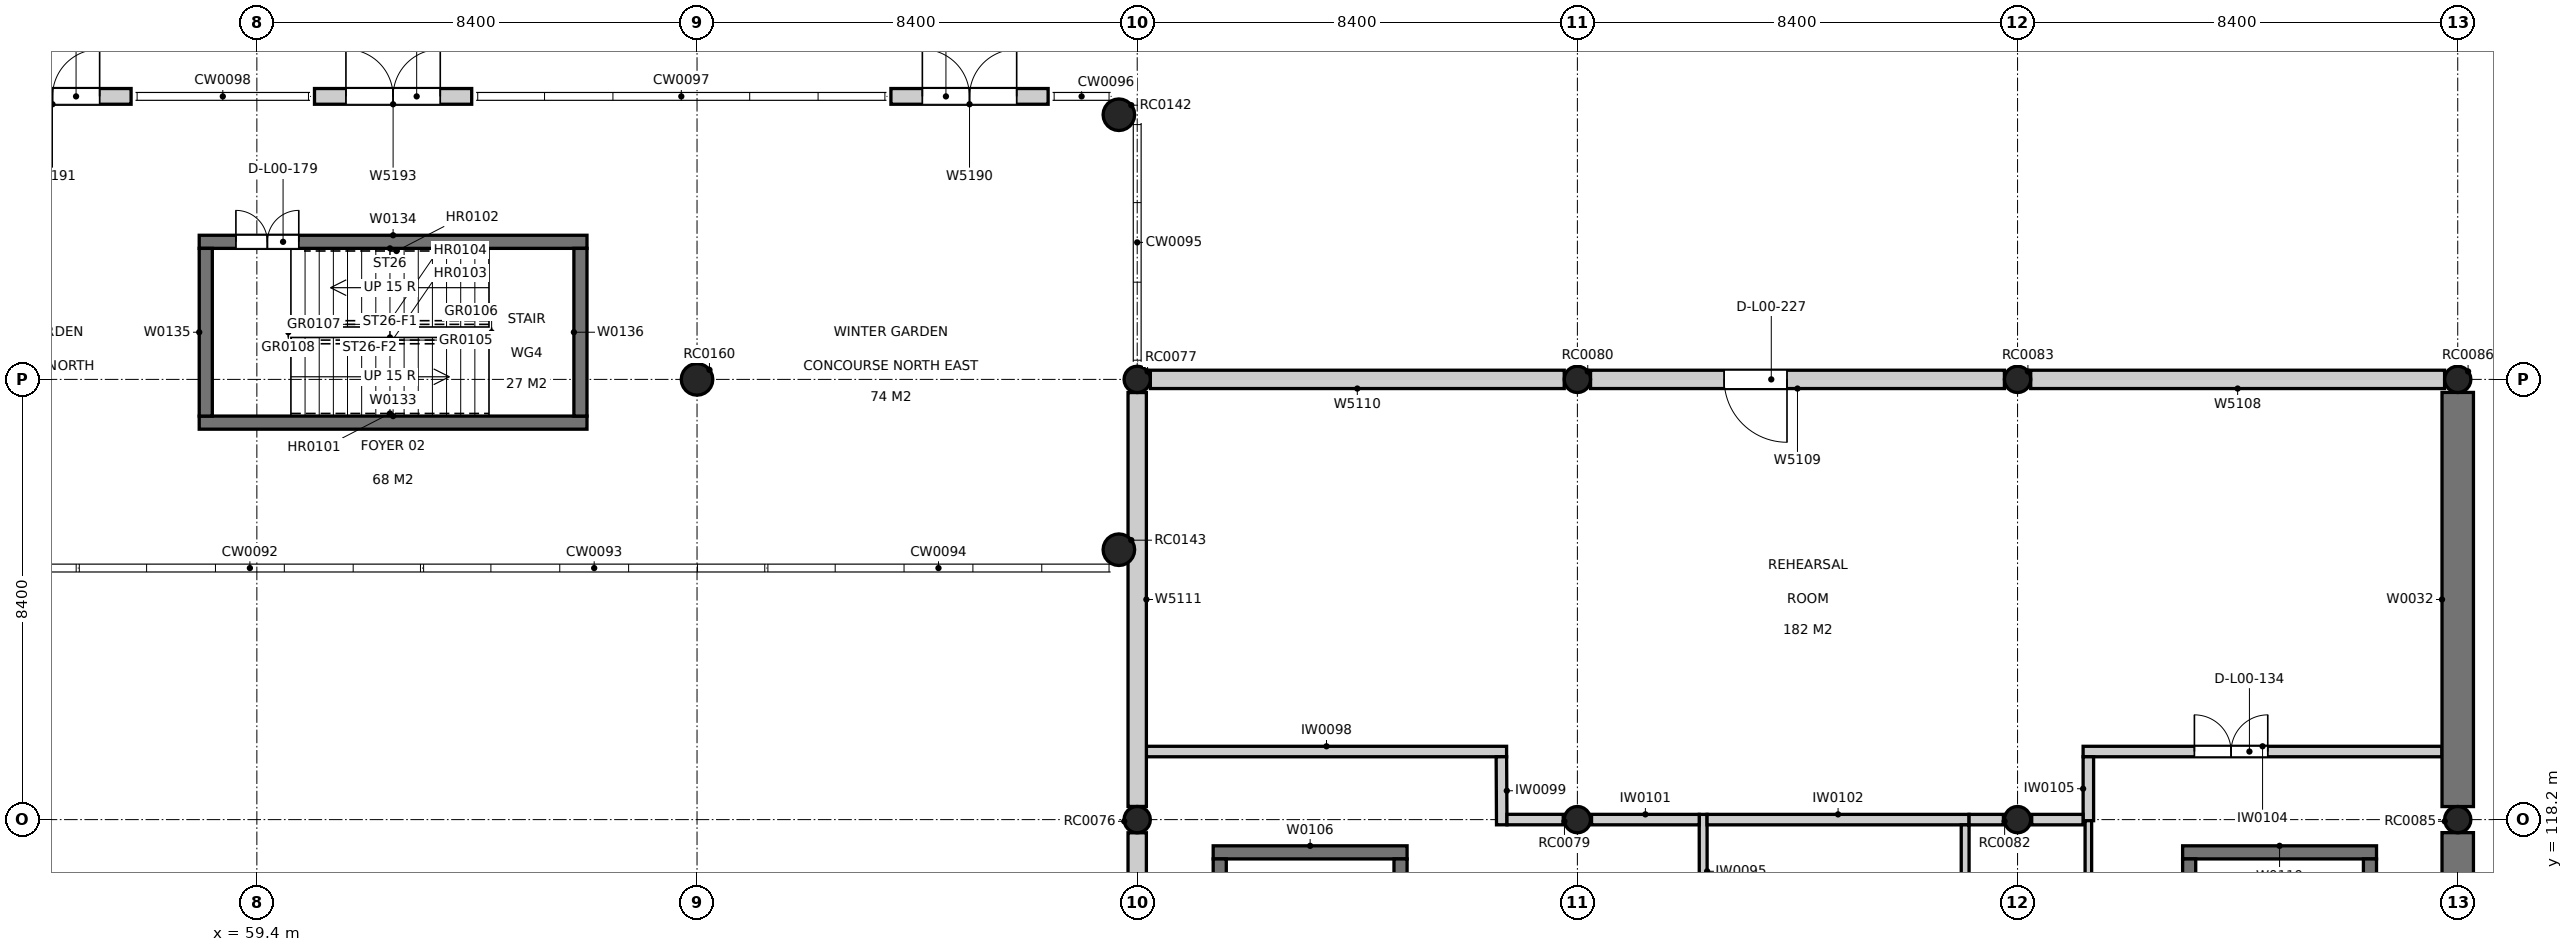
"""IFC4 building model, lengths in metres.
Left out: names, types, materials, properties, quantities, classifications, styles, units other than length and angle.
Written with IfcOpenShell. Run it as: python <this file> out.ifc"""

import sys

from ifc_helpers import new_model, si_unit, direction, frame, frame_2d, origin, origin_2d, place, context, subcontext, project, spatial, rectangle, circle, extrude, element, fill, save


model = new_model("IFC4")
c1 = context("Model", 3, precision=1e-05, world=origin(), true_north=direction((0.0, 1.0)))
c2 = subcontext(c1, "Body", "Model", "MODEL_VIEW")
j1 = project(units=[si_unit("LENGTHUNIT", "METRE"), si_unit("PLANEANGLEUNIT", "RADIAN")], contexts=[c1])
p1 = place(None, origin())
s1 = spatial("IfcSite", under=j1, at=p1, CompositionType="ELEMENT")
p2 = place(p1, origin())
s2 = spatial("IfcBuilding", under=s1, at=p2, CompositionType="ELEMENT")
p3 = place(p2, origin())
s3 = spatial("IfcBuildingStorey", under=s2, at=p3, CompositionType="ELEMENT", Elevation=0.0)
for number, where, z_axis, x_axis in (
    (1, (76.2, 118.2, -0.4), (0.0, 0.0, 1.0), (1.0, 0.0, 0.0)),
    (2, (76.2, 126.6, -0.4), (0.0, 0.0, 1.0), (1.0, 0.0, 0.0)),
    (3, (84.6, 118.2, -0.4), (0.0, 0.0, 1.0), (1.0, 0.0, 0.0)),
    (4, (84.6, 126.6, -0.4), (0.0, 0.0, 1.0), (1.0, 0.0, 0.0)),
    (5, (93.0, 118.2, -0.4), (0.0, 0.0, 1.0), (1.0, 0.0, 0.0)),
    (6, (93.0, 126.6, -0.4), (0.0, 0.0, 1.0), (1.0, 0.0, 0.0)),
    (7, (101.4, 118.2, -0.4), (0.0, 0.0, 1.0), (1.0, 0.0, 0.0)),
    (8, (101.4, 126.6, -0.4), (0.0, 0.0, 1.0), (1.0, 0.0, 0.0)),
):
    element("IfcColumn", number, at=place(p3, frame(where, z_axis=z_axis, x_axis=x_axis)), inside=s3, PredefinedType="COLUMN", context=c2, shape_type="SweptSolid", body=[
        extrude(circle(Radius=0.25, at=origin_2d()), origin(), (0.0, 0.0, 1.0), 5.2),
    ])
p4 = place(p3, frame((101.4, 110.049, 0.0), z_axis=(0.0, 0.0, 1.0), x_axis=(0.0, 1.0, 0.0)))
e9 = element("IfcWall", 9, at=p4, inside=s3, PredefinedType="SOLIDWALL", context=c2, shape_type="SweptSolid", body=[
    extrude(rectangle(XDim=7.902, YDim=0.6, at=frame_2d((3.951, 0.0))), origin(), (0.0, 0.0, 1.0), 4.8),
])
p5 = place(p4, frame((4.551, 0.0, 0.0), z_axis=(0.0, 0.0, 1.0), x_axis=(-1.0, 0.0, 0.0)))
e10 = element("IfcOpeningElement", 10, at=p5, cuts=e9, PredefinedType="OPENING", context=c2, shape_type="SweptSolid", body=[
    extrude(rectangle(XDim=1.2, YDim=2.1, at=frame_2d((0.6, 1.05))), frame((0.0, 0.31, 0.0), z_axis=(0.0, -1.0, 0.0), x_axis=(1.0, 0.0, 0.0)), (0.0, 0.0, 1.0), 0.62),
])
p6 = place(p3, frame((101.4, 118.449, 0.0), z_axis=(0.0, 0.0, 1.0), x_axis=(0.0, 1.0, 0.0)))
e11 = element("IfcWall", 11, at=p6, inside=s3, PredefinedType="SOLIDWALL", context=c2, shape_type="SweptSolid", body=[
    extrude(rectangle(XDim=7.902, YDim=0.6, at=frame_2d((3.951, 0.0))), origin(), (0.0, 0.0, 1.0), 4.8),
])
for number, where, z_axis, x_axis in (
    (12, (75.85, 131.65, -0.4), (0.0, 0.0, 1.0), (1.0, 0.0, 0.0)),
    (13, (75.85, 123.35, -0.4), (0.0, 0.0, 1.0), (1.0, 0.0, 0.0)),
    (14, (67.8, 126.6, -0.4), (0.0, 0.0, 1.0), (1.0, 0.0, 0.0)),
):
    element("IfcColumn", number, at=place(p3, frame(where, z_axis=z_axis, x_axis=x_axis)), inside=s3, PredefinedType="COLUMN", context=c2, shape_type="SweptSolid", body=[
        extrude(circle(Radius=0.3, at=origin_2d()), origin(), (0.0, 0.0, 1.0), 5.2),
    ])
p7 = place(p3, frame((77.65, 117.575, 0.0), z_axis=(0.0, 0.0, 1.0), x_axis=(1.0, 0.0, 0.0)))
e15 = element("IfcWall", 15, at=p7, inside=s3, PredefinedType="SOLIDWALL", context=c2, shape_type="SweptSolid", body=[
    extrude(rectangle(XDim=3.7, YDim=0.25, at=frame_2d((1.85, 0.0))), origin(), (0.0, 0.0, 1.0), 4.8),
])
p8 = place(p3, frame((77.775, 110.55, 0.0), z_axis=(0.0, 0.0, 1.0), x_axis=(0.0, 1.0, 0.0)))
e16 = element("IfcWall", 16, at=p8, inside=s3, PredefinedType="SOLIDWALL", context=c2, shape_type="SweptSolid", body=[
    extrude(rectangle(XDim=6.9, YDim=0.25, at=frame_2d((3.45, 0.0))), origin(), (0.0, 0.0, 1.0), 4.8),
])
p9 = place(p3, frame((81.225, 110.55, 0.0), z_axis=(0.0, 0.0, 1.0), x_axis=(0.0, 1.0, 0.0)))
e17 = element("IfcWall", 17, at=p9, inside=s3, PredefinedType="SOLIDWALL", context=c2, shape_type="SweptSolid", body=[
    extrude(rectangle(XDim=6.9, YDim=0.25, at=frame_2d((3.45, 0.0))), origin(), (0.0, 0.0, 1.0), 4.8),
])
p10 = place(p9, frame((5.15, 0.0, 0.0)))
e18 = element("IfcOpeningElement", 18, at=p10, cuts=e17, PredefinedType="OPENING", context=c2, shape_type="SweptSolid", body=[
    extrude(rectangle(XDim=1.2, YDim=2.1, at=frame_2d((0.6, 1.05))), frame((0.0, 0.135, 0.0), z_axis=(0.0, -1.0, 0.0), x_axis=(1.0, 0.0, 0.0)), (0.0, 0.0, 1.0), 0.27),
])
p11 = place(p3, frame((96.15, 117.575, 0.0), z_axis=(0.0, 0.0, 1.0), x_axis=(1.0, 0.0, 0.0)))
e19 = element("IfcWall", 19, at=p11, inside=s3, PredefinedType="SOLIDWALL", context=c2, shape_type="SweptSolid", body=[
    extrude(rectangle(XDim=3.7, YDim=0.25, at=frame_2d((1.85, 0.0))), origin(), (0.0, 0.0, 1.0), 4.8),
])
p12 = place(p3, frame((96.275, 110.55, 0.0), z_axis=(0.0, 0.0, 1.0), x_axis=(0.0, 1.0, 0.0)))
e20 = element("IfcWall", 20, at=p12, inside=s3, PredefinedType="SOLIDWALL", context=c2, shape_type="SweptSolid", body=[
    extrude(rectangle(XDim=6.9, YDim=0.25, at=frame_2d((3.45, 0.0))), origin(), (0.0, 0.0, 1.0), 4.8),
])
p13 = place(p3, frame((99.725, 110.55, 0.0), z_axis=(0.0, 0.0, 1.0), x_axis=(0.0, 1.0, 0.0)))
e21 = element("IfcWall", 21, at=p13, inside=s3, PredefinedType="SOLIDWALL", context=c2, shape_type="SweptSolid", body=[
    extrude(rectangle(XDim=6.9, YDim=0.25, at=frame_2d((3.45, 0.0))), origin(), (0.0, 0.0, 1.0), 4.8),
])
p14 = place(p13, frame((5.15, 0.0, 0.0)))
e22 = element("IfcOpeningElement", 22, at=p14, cuts=e21, PredefinedType="OPENING", context=c2, shape_type="SweptSolid", body=[
    extrude(rectangle(XDim=1.2, YDim=2.1, at=frame_2d((0.6, 1.05))), frame((0.0, 0.135, 0.0), z_axis=(0.0, -1.0, 0.0), x_axis=(1.0, 0.0, 0.0)), (0.0, 0.0, 1.0), 0.27),
])
p15 = place(p3, frame((58.3, 125.775, 0.0), z_axis=(0.0, 0.0, 1.0), x_axis=(1.0, 0.0, 0.0)))
e23 = element("IfcWall", 23, at=p15, inside=s3, PredefinedType="SOLIDWALL", context=c2, shape_type="SweptSolid", body=[
    extrude(rectangle(XDim=7.4, YDim=0.25, at=frame_2d((3.7, 0.0))), origin(), (0.0, 0.0, 1.0), 4.8),
])
p16 = place(p3, frame((58.3, 129.225, 0.0), z_axis=(0.0, 0.0, 1.0), x_axis=(1.0, 0.0, 0.0)))
e24 = element("IfcWall", 24, at=p16, inside=s3, PredefinedType="SOLIDWALL", context=c2, shape_type="SweptSolid", body=[
    extrude(rectangle(XDim=7.4, YDim=0.25, at=frame_2d((3.7, 0.0))), origin(), (0.0, 0.0, 1.0), 4.8),
])
p17 = place(p16, frame((0.7, 0.0, 0.0)))
e25 = element("IfcOpeningElement", 25, at=p17, cuts=e24, PredefinedType="OPENING", context=c2, shape_type="SweptSolid", body=[
    extrude(rectangle(XDim=1.2, YDim=2.1, at=frame_2d((0.6, 1.05))), frame((0.0, 0.135, 0.0), z_axis=(0.0, -1.0, 0.0), x_axis=(1.0, 0.0, 0.0)), (0.0, 0.0, 1.0), 0.27),
])
for number, where, z_axis, x_axis in (
    (26, (58.425, 125.9, 0.0), (0.0, 0.0, 1.0), (0.0, 1.0, 0.0)),
    (27, (65.575, 125.9, 0.0), (0.0, 0.0, 1.0), (0.0, 1.0, 0.0)),
):
    element("IfcWall", number, at=place(p3, frame(where, z_axis=z_axis, x_axis=x_axis)), inside=s3, PredefinedType="SOLIDWALL", context=c2, shape_type="SweptSolid", body=[
        extrude(rectangle(XDim=3.2, YDim=0.25, at=frame_2d((1.6, 0.0))), origin(), (0.0, 0.0, 1.0), 4.8),
    ])
p18 = place(p3, frame((87.0, 118.3, 0.0), z_axis=(0.0, 0.0, 1.0), x_axis=(0.000899179135, -0.999999595738, 0.0)))
e28 = element("IfcWall", 28, at=p18, inside=s3, PredefinedType="PARTITIONING", context=c2, shape_type="SweptSolid", body=[
    extrude(rectangle(XDim=2.172, YDim=0.15, at=frame_2d((1.086, 0.0))), origin(), (0.0, 0.0, 1.0), 3.8),
])
p19 = place(p3, frame((76.375, 119.499, 0.0), z_axis=(0.0, 0.0, 1.0), x_axis=(1.0, 0.0, 0.0)))
e29 = element("IfcWall", 29, at=p19, inside=s3, PredefinedType="PARTITIONING", context=c2, shape_type="SweptSolid", body=[
    extrude(rectangle(XDim=6.874, YDim=0.2, at=frame_2d((3.437, 0.0))), origin(), (0.0, 0.0, 1.0), 4.6),
])
p20 = place(p3, frame((83.15, 119.399, 0.0), z_axis=(0.0, 0.0, 1.0), x_axis=(0.005267045074, -0.999986129022, 0.0)))
e30 = element("IfcWall", 30, at=p20, inside=s3, PredefinedType="PARTITIONING", context=c2, shape_type="SweptSolid", body=[
    extrude(rectangle(XDim=1.298, YDim=0.2, at=frame_2d((0.649, 0.0))), origin(), (0.0, 0.0, 1.0), 3.8),
])
p21 = place(p3, frame((83.256, 118.201, 0.0), z_axis=(0.0, 0.0, 1.0), x_axis=(0.999999974162, -0.000227324386, 0.0)))
e31 = element("IfcWall", 31, at=p21, inside=s3, PredefinedType="PARTITIONING", context=c2, shape_type="SweptSolid", body=[
    extrude(rectangle(XDim=1.074, YDim=0.2, at=frame_2d((0.537, 0.0))), origin(), (0.0, 0.0, 1.0), 3.8),
])
p22 = place(p3, frame((84.87, 118.2, 0.0), z_axis=(0.0, 0.0, 1.0), x_axis=(0.99999997177, -0.000237614345, 0.0)))
e32 = element("IfcWall", 32, at=p22, inside=s3, PredefinedType="PARTITIONING", context=c2, shape_type="SweptSolid", body=[
    extrude(rectangle(XDim=2.055, YDim=0.2, at=frame_2d((1.027, 0.0))), origin(), (0.0, 0.0, 1.0), 3.8),
])
p23 = place(p3, frame((87.075, 118.2, 0.0), z_axis=(0.0, 0.0, 1.0), x_axis=(1.0, 0.0, 0.0)))
e33 = element("IfcWall", 33, at=p23, inside=s3, PredefinedType="PARTITIONING", context=c2, shape_type="SweptSolid", body=[
    extrude(rectangle(XDim=5.0, YDim=0.2, at=frame_2d((2.5, 0.0))), origin(), (0.0, 0.0, 1.0), 3.8),
])
p24 = place(p3, frame((92.0, 118.1, 0.0), z_axis=(0.0, 0.0, 1.0), x_axis=(0.0, -1.0, 0.0)))
e34 = element("IfcWall", 34, at=p24, inside=s3, PredefinedType="PARTITIONING", context=c2, shape_type="SweptSolid", body=[
    extrude(rectangle(XDim=8.125, YDim=0.15, at=frame_2d((4.062, 0.0))), origin(), (0.0, 0.0, 1.0), 3.8),
])
p25 = place(p3, frame((94.251, 119.499, 0.0), z_axis=(0.0, 0.0, 1.0), x_axis=(1.0, 0.0, 0.0)))
e35 = element("IfcWall", 35, at=p25, inside=s3, PredefinedType="PARTITIONING", context=c2, shape_type="SweptSolid", body=[
    extrude(rectangle(XDim=6.849, YDim=0.2, at=frame_2d((3.425, 0.0))), origin(), (0.0, 0.0, 1.0), 4.6),
])
p26 = place(p25, frame((2.124, 0.0, 0.0)))
e36 = element("IfcOpeningElement", 36, at=p26, cuts=e35, PredefinedType="OPENING", context=c2, shape_type="SweptSolid", body=[
    extrude(rectangle(XDim=1.4, YDim=2.1, at=frame_2d((0.7, 1.05))), frame((0.0, 0.11, 0.0), z_axis=(0.0, -1.0, 0.0), x_axis=(1.0, 0.0, 0.0)), (0.0, 0.0, 1.0), 0.22),
])
p27 = place(p3, frame((94.351, 118.18, 0.0), z_axis=(0.0, 0.0, 1.0), x_axis=(0.0, 1.0, 0.0)))
e37 = element("IfcWall", 37, at=p27, inside=s3, PredefinedType="PARTITIONING", context=c2, shape_type="SweptSolid", body=[
    extrude(rectangle(XDim=1.219, YDim=0.2, at=frame_2d((0.609, 0.0))), origin(), (0.0, 0.0, 1.0), 3.8),
])
p28 = place(p3, frame((94.351, 109.975, 0.0), z_axis=(0.0, 0.0, 1.0), x_axis=(0.0, 1.0, 0.0)))
e38 = element("IfcWall", 38, at=p28, inside=s3, PredefinedType="PARTITIONING", context=c2, shape_type="SweptSolid", body=[
    extrude(rectangle(XDim=8.205, YDim=0.125, at=frame_2d((4.103, 0.0))), origin(), (0.0, 0.0, 1.0), 3.8),
])
p29 = place(p28, frame((3.591, 0.0, 0.0)))
e39 = element("IfcOpeningElement", 39, at=p29, cuts=e38, PredefinedType="OPENING", context=c2, shape_type="SweptSolid", body=[
    extrude(rectangle(XDim=0.9, YDim=2.1, at=frame_2d((0.45, 1.05))), frame((0.0, 0.073, 0.0), z_axis=(0.0, -1.0, 0.0), x_axis=(1.0, 0.0, 0.0)), (0.0, 0.0, 1.0), 0.145),
])
p30 = place(p3, frame((94.25, 118.2, 0.0), z_axis=(0.0, 0.0, 1.0), x_axis=(-1.0, 0.0, 0.0)))
e40 = element("IfcWall", 40, at=p30, inside=s3, PredefinedType="PARTITIONING", context=c2, shape_type="SweptSolid", body=[
    extrude(rectangle(XDim=0.98, YDim=0.2, at=frame_2d((0.49, 0.0))), origin(), (0.0, 0.0, 1.0), 3.8),
])
p31 = place(p3, frame((92.73, 118.2, 0.0), z_axis=(0.0, 0.0, 1.0), x_axis=(-1.0, 0.0, 0.0)))
e41 = element("IfcWall", 41, at=p31, inside=s3, PredefinedType="PARTITIONING", context=c2, shape_type="SweptSolid", body=[
    extrude(rectangle(XDim=0.655, YDim=0.2, at=frame_2d((0.328, 0.0))), origin(), (0.0, 0.0, 1.0), 3.8),
])
p32 = place(p3, frame((101.149, 126.6, 0.0), z_axis=(0.0, 0.0, 1.0), x_axis=(-1.0, 0.0, 0.0)))
e42 = element("IfcWall", 42, at=p32, inside=s3, PredefinedType="SOLIDWALL", context=c2, shape_type="SweptSolid", body=[
    extrude(rectangle(XDim=7.898, YDim=0.35, at=frame_2d((3.949, 0.0))), origin(), (0.0, 0.0, 1.0), 3.8),
])
p33 = place(p3, frame((92.749, 126.6, 0.0), z_axis=(0.0, 0.0, 1.0), x_axis=(-1.0, 0.0, 0.0)))
e43 = element("IfcWall", 43, at=p33, inside=s3, PredefinedType="SOLIDWALL", context=c2, shape_type="SweptSolid", body=[
    extrude(rectangle(XDim=7.898, YDim=0.35, at=frame_2d((3.949, 0.0))), origin(), (0.0, 0.0, 1.0), 3.8),
])
p34 = place(p33, frame((4.149, 0.0, 0.0)))
e44 = element("IfcOpeningElement", 44, at=p34, cuts=e43, PredefinedType="OPENING", context=c2, shape_type="SweptSolid", body=[
    extrude(rectangle(XDim=1.2, YDim=2.4, at=frame_2d((0.6, 1.2))), frame((0.0, 0.185, 0.0), z_axis=(0.0, -1.0, 0.0), x_axis=(1.0, 0.0, 0.0)), (0.0, 0.0, 1.0), 0.37),
])
for number, where, z_axis, x_axis in (
    (45, (84.349, 126.6, 0.0), (0.0, 0.0, 1.0), (-1.0, 0.0, 0.0)),
    (46, (76.2, 126.349, 0.0), (0.0, 0.0, 1.0), (0.0, -1.0, 0.0)),
):
    element("IfcWall", number, at=place(p3, frame(where, z_axis=z_axis, x_axis=x_axis)), inside=s3, PredefinedType="SOLIDWALL", context=c2, shape_type="SweptSolid", body=[
        extrude(rectangle(XDim=7.898, YDim=0.35, at=frame_2d((3.949, 0.0))), origin(), (0.0, 0.0, 1.0), 3.8),
    ])
p35 = place(p3, frame((76.2, 117.949, 0.0), z_axis=(0.0, 0.0, 1.0), x_axis=(0.0, -1.0, 0.0)))
e47 = element("IfcWall", 47, at=p35, inside=s3, PredefinedType="SOLIDWALL", context=c2, shape_type="SweptSolid", body=[
    extrude(rectangle(XDim=7.898, YDim=0.35, at=frame_2d((3.949, 0.0))), origin(), (0.0, 0.0, 1.0), 3.8),
])
p36 = place(p35, frame((4.849, 0.0, 0.0), z_axis=(0.0, 0.0, 1.0), x_axis=(-1.0, 0.0, 0.0)))
e48 = element("IfcOpeningElement", 48, at=p36, cuts=e47, PredefinedType="OPENING", context=c2, shape_type="SweptSolid", body=[
    extrude(rectangle(XDim=1.8, YDim=2.1, at=frame_2d((0.9, 1.05))), frame((0.0, 0.185, 0.0), z_axis=(0.0, -1.0, 0.0), x_axis=(1.0, 0.0, 0.0)), (0.0, 0.0, 1.0), 0.37),
])
p37 = place(p3, frame((74.5, 132.0, 0.0), z_axis=(0.0, 0.0, 1.0), x_axis=(-1.0, 0.0, 0.0)))
e49 = element("IfcWall", 49, at=p37, inside=s3, PredefinedType="SOLIDWALL", context=c2, shape_type="SweptSolid", body=[
    extrude(rectangle(XDim=3.0, YDim=0.3, at=frame_2d((1.5, 0.0))), origin(), (0.0, 0.0, 1.0), 3.9),
])
p38 = place(p37, frame((2.4, 0.0, 0.0), z_axis=(0.0, 0.0, 1.0), x_axis=(-1.0, 0.0, 0.0)))
e50 = element("IfcOpeningElement", 50, at=p38, cuts=e49, PredefinedType="OPENING", context=c2, shape_type="SweptSolid", body=[
    extrude(rectangle(XDim=1.8, YDim=2.1, at=frame_2d((0.9, 1.05))), frame((0.0, 0.16, 0.0), z_axis=(0.0, -1.0, 0.0), x_axis=(1.0, 0.0, 0.0)), (0.0, 0.0, 1.0), 0.32),
])
p39 = place(p3, frame((57.0, 132.0, 0.0), z_axis=(0.0, 0.0, 1.0), x_axis=(-1.0, 0.0, 0.0)))
e51 = element("IfcWall", 51, at=p39, inside=s3, PredefinedType="SOLIDWALL", context=c2, shape_type="SweptSolid", body=[
    extrude(rectangle(XDim=3.0, YDim=0.3, at=frame_2d((1.5, 0.0))), origin(), (0.0, 0.0, 1.0), 3.9),
])
p40 = place(p39, frame((2.4, 0.0, 0.0), z_axis=(0.0, 0.0, 1.0), x_axis=(-1.0, 0.0, 0.0)))
e52 = element("IfcOpeningElement", 52, at=p40, cuts=e51, PredefinedType="OPENING", context=c2, shape_type="SweptSolid", body=[
    extrude(rectangle(XDim=1.8, YDim=2.1, at=frame_2d((0.9, 1.05))), frame((0.0, 0.16, 0.0), z_axis=(0.0, -1.0, 0.0), x_axis=(1.0, 0.0, 0.0)), (0.0, 0.0, 1.0), 0.32),
])
p41 = place(p3, frame((63.5, 132.0, 0.0), z_axis=(0.0, 0.0, 1.0), x_axis=(-1.0, 0.0, 0.0)))
e53 = element("IfcWall", 53, at=p41, inside=s3, PredefinedType="SOLIDWALL", context=c2, shape_type="SweptSolid", body=[
    extrude(rectangle(XDim=3.0, YDim=0.3, at=frame_2d((1.5, 0.0))), origin(), (0.0, 0.0, 1.0), 3.9),
])
p42 = place(p41, frame((2.4, 0.0, 0.0), z_axis=(0.0, 0.0, 1.0), x_axis=(-1.0, 0.0, 0.0)))
e54 = element("IfcOpeningElement", 54, at=p42, cuts=e53, PredefinedType="OPENING", context=c2, shape_type="SweptSolid", body=[
    extrude(rectangle(XDim=1.8, YDim=2.1, at=frame_2d((0.9, 1.05))), frame((0.0, 0.16, 0.0), z_axis=(0.0, -1.0, 0.0), x_axis=(1.0, 0.0, 0.0)), (0.0, 0.0, 1.0), 0.32),
])
p43 = place(p26, origin())
e55 = element("IfcDoor", 55, at=p43, inside=s3, OperationType="DOUBLE_DOOR_SINGLE_SWING", PredefinedType="DOOR", context=c2, shape_type="SweptSolid", body=[
    extrude(rectangle(XDim=1.4, YDim=2.1, at=frame_2d((0.7, 1.05))), frame((0.0, 0.025, 0.0), z_axis=(0.0, -1.0, 0.0), x_axis=(1.0, 0.0, 0.0)), (0.0, 0.0, 1.0), 0.05),
])
fill(e36, e55)
p44 = place(p17, origin())
e56 = element("IfcDoor", 56, at=p44, inside=s3, OperationType="DOUBLE_DOOR_SINGLE_SWING", PredefinedType="DOOR", context=c2, shape_type="SweptSolid", body=[
    extrude(rectangle(XDim=1.2, YDim=2.1, at=frame_2d((0.6, 1.05))), frame((0.0, 0.025, 0.0), z_axis=(0.0, -1.0, 0.0), x_axis=(1.0, 0.0, 0.0)), (0.0, 0.0, 1.0), 0.05),
])
fill(e25, e56)
p45 = place(p34, origin())
e57 = element("IfcDoor", 57, at=p45, inside=s3, OperationType="SINGLE_SWING_LEFT", PredefinedType="DOOR", context=c2, shape_type="SweptSolid", body=[
    extrude(rectangle(XDim=1.2, YDim=2.4, at=frame_2d((0.6, 1.2))), frame((0.0, 0.025, 0.0), z_axis=(0.0, -1.0, 0.0), x_axis=(1.0, 0.0, 0.0)), (0.0, 0.0, 1.0), 0.05),
])
fill(e44, e57)
p46 = place(p38, origin())
e58 = element("IfcDoor", 58, at=p46, inside=s3, OperationType="DOUBLE_DOOR_SINGLE_SWING", PredefinedType="DOOR", context=c2, shape_type="SweptSolid", body=[
    extrude(rectangle(XDim=1.8, YDim=2.1, at=frame_2d((0.9, 1.05))), frame((0.0, 0.025, 0.0), z_axis=(0.0, -1.0, 0.0), x_axis=(1.0, 0.0, 0.0)), (0.0, 0.0, 1.0), 0.05),
])
fill(e50, e58)
p47 = place(p40, origin())
e59 = element("IfcDoor", 59, at=p47, inside=s3, OperationType="DOUBLE_DOOR_SINGLE_SWING", PredefinedType="DOOR", context=c2, shape_type="SweptSolid", body=[
    extrude(rectangle(XDim=1.8, YDim=2.1, at=frame_2d((0.9, 1.05))), frame((0.0, 0.025, 0.0), z_axis=(0.0, -1.0, 0.0), x_axis=(1.0, 0.0, 0.0)), (0.0, 0.0, 1.0), 0.05),
])
fill(e52, e59)
p48 = place(p42, origin())
e60 = element("IfcDoor", 60, at=p48, inside=s3, OperationType="DOUBLE_DOOR_SINGLE_SWING", PredefinedType="DOOR", context=c2, shape_type="SweptSolid", body=[
    extrude(rectangle(XDim=1.8, YDim=2.1, at=frame_2d((0.9, 1.05))), frame((0.0, 0.025, 0.0), z_axis=(0.0, -1.0, 0.0), x_axis=(1.0, 0.0, 0.0)), (0.0, 0.0, 1.0), 0.05),
])
fill(e54, e60)
save(model, sys.argv[1])
